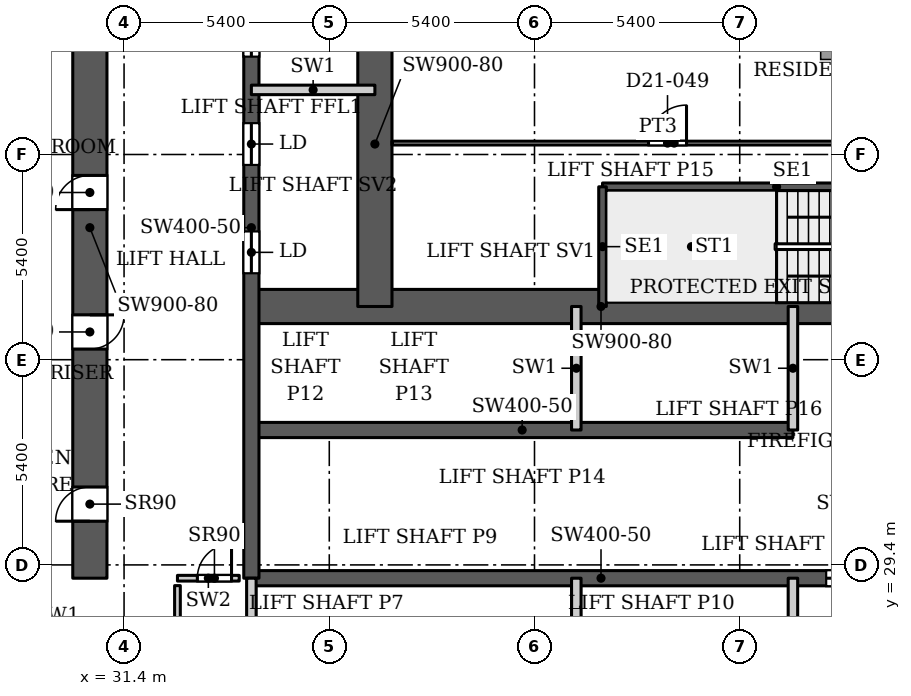
"""IFC4 building model, lengths in metres.
Left out: names, types, materials, properties, quantities, classifications, styles, units other than length and angle.
Written with IfcOpenShell. Run it as: python <this file> out.ifc"""

import sys

from ifc_helpers import new_model, si_unit, direction, frame, frame_2d, origin, place, context, subcontext, project, spatial, rectangle, extrude, source, transform, mapped, element, fill, save


model = new_model("IFC4")
c1 = context("Model", 3, precision=1e-05, world=origin(), true_north=direction((0.0, 1.0)))
c2 = subcontext(c1, "Body", "Model", "MODEL_VIEW")
j1 = project(units=[si_unit("LENGTHUNIT", "METRE"), si_unit("PLANEANGLEUNIT", "RADIAN")], contexts=[c1])
p1 = place(None, origin())
s1 = spatial("IfcSite", under=j1, at=p1, CompositionType="ELEMENT")
p2 = place(p1, origin())
s2 = spatial("IfcBuilding", under=s1, at=p2, CompositionType="ELEMENT")
p3 = place(p2, frame((0.0, 0.0, 94.1)))
s3 = spatial("IfcBuildingStorey", under=s2, at=p3, CompositionType="ELEMENT", Elevation=94.1)
p4 = place(p3, frame((34.75, 29.05, 0.0), z_axis=(0.0, 0.0, 1.0), x_axis=(1.0, 0.0, 0.0)))
e1 = element("IfcWall", 1, at=p4, inside=s3, PredefinedType="SHEAR", context=c2, shape_type="SweptSolid", body=[
    extrude(rectangle(XDim=18.4, YDim=0.4, at=frame_2d((9.2, 0.0))), origin(), (0.0, 0.0, 1.0), 3.9),
])
p5 = place(p4, frame((15.125, 0.0, 0.0)))
e2 = element("IfcOpeningElement", 2, at=p5, cuts=e1, PredefinedType="OPENING", context=c2, shape_type="SweptSolid", body=[
    extrude(rectangle(XDim=1.1, YDim=2.2, at=frame_2d((0.55, 1.1))), frame((0.0, 0.21, 0.0), z_axis=(0.0, -1.0, 0.0), x_axis=(1.0, 0.0, 0.0)), (0.0, 0.0, 1.0), 0.42),
])
p6 = place(p3, frame((34.75, 32.95, 0.0), z_axis=(0.0, 0.0, 1.0), x_axis=(1.0, 0.0, 0.0)))
e3 = element("IfcWall", 3, at=p6, inside=s3, PredefinedType="SHEAR", context=c2, shape_type="SweptSolid", body=[
    extrude(rectangle(XDim=14.25, YDim=0.4, at=frame_2d((7.125, 0.0))), origin(), (0.0, 0.0, 1.0), 3.9),
])
p7 = place(p3, frame((34.75, 36.2, 0.0), z_axis=(0.0, 0.0, 1.0), x_axis=(1.0, 0.0, 0.0)))
e4 = element("IfcWall", 4, at=p7, inside=s3, PredefinedType="SHEAR", context=c2, shape_type="SweptSolid", body=[
    extrude(rectangle(XDim=18.4, YDim=0.9, at=frame_2d((9.2, 0.0))), origin(), (0.0, 0.0, 1.0), 3.9),
])
p8 = place(p7, frame((16.9, 0.0, 0.0)))
e5 = element("IfcOpeningElement", 5, at=p8, cuts=e4, PredefinedType="OPENING", context=c2, shape_type="SweptSolid", body=[
    extrude(rectangle(XDim=1.0, YDim=2.2, at=frame_2d((0.5, 1.1))), frame((0.0, 0.46, 0.0), z_axis=(0.0, -1.0, 0.0), x_axis=(1.0, 0.0, 0.0)), (0.0, 0.0, 1.0), 0.92),
])
p9 = place(p3, frame((34.75, 29.05, 0.0), z_axis=(0.0, 0.0, 1.0), x_axis=(0.0, 1.0, 0.0)))
e6 = element("IfcWall", 6, at=p9, inside=s3, PredefinedType="SHEAR", context=c2, shape_type="SweptSolid", body=[
    extrude(rectangle(XDim=18.45, YDim=0.4, at=frame_2d((9.225, 0.0))), origin(), (0.0, 0.0, 1.0), 3.9),
])
p10 = place(p9, frame((8.025, 0.0, 0.0)))
e7 = element("IfcOpeningElement", 7, at=p10, cuts=e6, PredefinedType="OPENING", context=c2, shape_type="SweptSolid", body=[
    extrude(rectangle(XDim=1.1, YDim=2.2, at=frame_2d((0.55, 1.1))), frame((0.0, 0.21, 0.0), z_axis=(0.0, -1.0, 0.0), x_axis=(1.0, 0.0, 0.0)), (0.0, 0.0, 1.0), 0.42),
])
p11 = place(p9, frame((10.875, 0.0, 0.0)))
e8 = element("IfcOpeningElement", 8, at=p11, cuts=e6, PredefinedType="OPENING", context=c2, shape_type="SweptSolid", body=[
    extrude(rectangle(XDim=1.1, YDim=2.2, at=frame_2d((0.55, 1.1))), frame((0.0, 0.21, 0.0), z_axis=(0.0, -1.0, 0.0), x_axis=(1.0, 0.0, 0.0)), (0.0, 0.0, 1.0), 0.42),
])
p12 = place(p9, frame((13.725, 0.0, 0.0)))
e9 = element("IfcOpeningElement", 9, at=p12, cuts=e6, PredefinedType="OPENING", context=c2, shape_type="SweptSolid", body=[
    extrude(rectangle(XDim=1.1, YDim=2.2, at=frame_2d((0.55, 1.1))), frame((0.0, 0.21, 0.0), z_axis=(0.0, -1.0, 0.0), x_axis=(1.0, 0.0, 0.0)), (0.0, 0.0, 1.0), 0.42),
])
p13 = place(p9, frame((15.95, 0.0, 0.0)))
e10 = element("IfcOpeningElement", 10, at=p13, cuts=e6, PredefinedType="OPENING", context=c2, shape_type="SweptSolid", body=[
    extrude(rectangle(XDim=1.1, YDim=2.2, at=frame_2d((0.55, 1.1))), frame((0.0, 0.21, 0.0), z_axis=(0.0, -1.0, 0.0), x_axis=(1.0, 0.0, 0.0)), (0.0, 0.0, 1.0), 0.42),
])
p14 = place(p3, frame((38.0, 36.2, 0.0), z_axis=(0.0, 0.0, 1.0), x_axis=(0.0, 1.0, 0.0)))
e11 = element("IfcWall", 11, at=p14, inside=s3, PredefinedType="SHEAR", context=c2, shape_type="SweptSolid", body=[
    extrude(rectangle(XDim=8.55, YDim=0.9, at=frame_2d((4.275, 0.0))), origin(), (0.0, 0.0, 1.0), 3.9),
])
p15 = place(p3, frame((30.5, 29.05, 0.0), z_axis=(0.0, 0.0, 1.0), x_axis=(0.0, 1.0, 0.0)))
e12 = element("IfcWall", 12, at=p15, inside=s3, PredefinedType="SHEAR", context=c2, shape_type="SweptSolid", body=[
    extrude(rectangle(XDim=18.45, YDim=0.9, at=frame_2d((9.225, 0.0))), origin(), (0.0, 0.0, 1.0), 3.9),
])
p16 = place(p15, frame((1.5, 0.0, 0.0)))
e13 = element("IfcOpeningElement", 13, at=p16, cuts=e12, PredefinedType="OPENING", context=c2, shape_type="SweptSolid", body=[
    extrude(rectangle(XDim=0.9, YDim=2.2, at=frame_2d((0.45, 1.1))), frame((0.0, 0.46, 0.0), z_axis=(0.0, -1.0, 0.0), x_axis=(1.0, 0.0, 0.0)), (0.0, 0.0, 1.0), 0.92),
])
p17 = place(p15, frame((6.03, 0.0, 0.0)))
e14 = element("IfcOpeningElement", 14, at=p17, cuts=e12, PredefinedType="OPENING", context=c2, shape_type="SweptSolid", body=[
    extrude(rectangle(XDim=0.9, YDim=2.2, at=frame_2d((0.45, 1.1))), frame((0.0, 0.46, 0.0), z_axis=(0.0, -1.0, 0.0), x_axis=(1.0, 0.0, 0.0)), (0.0, 0.0, 1.0), 0.92),
])
p18 = place(p15, frame((9.7, 0.0, 0.0)))
e15 = element("IfcOpeningElement", 15, at=p18, cuts=e12, PredefinedType="OPENING", context=c2, shape_type="SweptSolid", body=[
    extrude(rectangle(XDim=0.9, YDim=2.2, at=frame_2d((0.45, 1.1))), frame((0.0, 0.46, 0.0), z_axis=(0.0, -1.0, 0.0), x_axis=(1.0, 0.0, 0.0)), (0.0, 0.0, 1.0), 0.92),
])
p19 = place(p3, frame((29.712, 26.072, 0.0), z_axis=(0.0, 0.0, 1.0), x_axis=(-0.511028049012, 0.859564036662, 0.0)))
e16 = element("IfcWall", 16, at=p19, inside=s3, PredefinedType="SOLIDWALL", context=c2, shape_type="SweptSolid", body=[
    extrude(rectangle(XDim=4.634, YDim=0.25, at=frame_2d((2.317, 0.0))), origin(), (0.0, 0.0, 1.0), 3.147),
])
p20 = place(p3, frame((27.195, 31.969, 0.0), z_axis=(0.0, 0.0, 1.0), x_axis=(0.052559748861, 0.998617781135, 0.0)))
e17 = element("IfcWall", 17, at=p20, inside=s3, PredefinedType="SOLIDWALL", context=c2, shape_type="SweptSolid", body=[
    extrude(rectangle(XDim=55.972, YDim=0.25, at=frame_2d((27.986, 0.0))), origin(), (0.0, 0.0, 1.0), 3.75),
])
p21 = place(p3, frame((43.99, 39.35, 0.0), z_axis=(0.0, 0.0, 1.0), x_axis=(1.0, 0.0, 0.0)))
e18 = element("IfcWall", 18, at=p21, inside=s3, PredefinedType="SHEAR", context=c2, shape_type="SweptSolid", body=[
    extrude(rectangle(XDim=9.16, YDim=0.2, at=frame_2d((4.58, 0.0))), origin(), (0.0, 0.0, 1.0), 3.9),
])
p22 = place(p3, frame((43.99, 36.2, 0.0), z_axis=(0.0, 0.0, 1.0), x_axis=(0.0, 1.0, 0.0)))
e19 = element("IfcWall", 19, at=p22, inside=s3, PredefinedType="SHEAR", context=c2, shape_type="SweptSolid", body=[
    extrude(rectangle(XDim=3.15, YDim=0.2, at=frame_2d((1.575, 0.0))), origin(), (0.0, 0.0, 1.0), 3.9),
])
for number, where, z_axis, x_axis in (
    (20, (34.75, 25.8, 0.0), (0.0, 0.0, 1.0), (0.0, 1.0, 0.0)),
    (21, (43.3, 25.8, 0.0), (0.0, 0.0, 1.0), (0.0, 1.0, 0.0)),
    (22, (43.3, 32.95, 0.0), (0.0, 0.0, 1.0), (0.0, 1.0, 0.0)),
    (23, (49.0, 25.8, 0.0), (0.0, 0.0, 1.0), (0.0, 1.0, 0.0)),
    (24, (49.0, 32.95, 0.0), (0.0, 0.0, 1.0), (0.0, 1.0, 0.0)),
    (25, (34.75, 41.9, 0.0), (0.0, 0.0, 1.0), (1.0, 0.0, 0.0)),
):
    element("IfcWall", number, at=place(p3, frame(where, z_axis=z_axis, x_axis=x_axis)), inside=s3, PredefinedType="PARTITIONING", context=c2, shape_type="SweptSolid", body=[
        extrude(rectangle(XDim=3.25, YDim=0.25, at=frame_2d((1.625, 0.0))), origin(), (0.0, 0.0, 1.0), 3.9),
    ])
p23 = place(p3, frame((32.805, 29.05, 0.0), z_axis=(0.0, 0.0, 1.0), x_axis=(1.0, 0.0, 0.0)))
e26 = element("IfcWall", 26, at=p23, inside=s3, PredefinedType="PARTITIONING", context=c2, shape_type="SweptSolid", body=[
    extrude(rectangle(XDim=1.625, YDim=0.15, at=frame_2d((0.812, 0.0))), origin(), (0.0, 0.0, 1.0), 3.9),
])
p24 = place(p23, frame((0.523, 0.0, 0.0)))
e27 = element("IfcOpeningElement", 27, at=p24, cuts=e26, PredefinedType="OPENING", context=c2, shape_type="SweptSolid", body=[
    extrude(rectangle(XDim=0.9, YDim=2.2, at=frame_2d((0.45, 1.1))), frame((0.0, 0.085, 0.0), z_axis=(0.0, -1.0, 0.0), x_axis=(1.0, 0.0, 0.0)), (0.0, 0.0, 1.0), 0.17),
])
p25 = place(p3, frame((32.805, 24.98, 0.0), z_axis=(0.0, 0.0, 1.0), x_axis=(0.0, 1.0, 0.0)))
e28 = element("IfcWall", 28, at=p25, inside=s3, PredefinedType="PARTITIONING", context=c2, shape_type="SweptSolid", body=[
    extrude(rectangle(XDim=3.875, YDim=0.15, at=frame_2d((1.938, 0.0))), origin(), (0.0, 0.0, 1.0), 3.9),
])
p26 = place(p3, frame((38.449, 40.5, 0.0), z_axis=(0.0, 0.0, 1.0), x_axis=(1.0, 0.0, 0.0)))
e29 = element("IfcWall", 29, at=p26, inside=s3, PredefinedType="PARTITIONING", context=c2, shape_type="SweptSolid", body=[
    extrude(rectangle(XDim=14.851, YDim=0.1, at=frame_2d((7.426, 0.0))), origin(), (0.0, 0.0, 1.0), 3.6),
])
p27 = place(p26, frame((6.751, 0.0, 0.0)))
e30 = element("IfcOpeningElement", 30, at=p27, cuts=e29, PredefinedType="OPENING", context=c2, shape_type="SweptSolid", body=[
    extrude(rectangle(XDim=1.0, YDim=2.1, at=frame_2d((0.5, 1.05))), frame((0.0, 0.06, 0.0), z_axis=(0.0, -1.0, 0.0), x_axis=(1.0, 0.0, 0.0)), (0.0, 0.0, 1.0), 0.12),
])
m1 = source(origin(), c2, "Body", "SweptSolid", [
    extrude(rectangle(XDim=1.1, YDim=2.2, at=frame_2d((0.55, 1.1))), frame((0.0, 0.025, 0.0), z_axis=(0.0, -1.0, 0.0), x_axis=(1.0, 0.0, 0.0)), (0.0, 0.0, 1.0), 0.05),
])
p28 = place(p10, origin())
e31 = element("IfcDoor", 31, at=p28, inside=s3, OperationType="SLIDING_TO_LEFT", PredefinedType="DOOR", context=c2, shape_type="MappedRepresentation", body=[
    mapped(m1, transform((0.0, 0.0, 0.0), x_axis=(1.0, 0.0, 0.0), y_axis=(0.0, 1.0, 0.0), z_axis=(0.0, 0.0, 1.0), scale=1.0)),
])
fill(e7, e31)
p29 = place(p11, origin())
e32 = element("IfcDoor", 32, at=p29, inside=s3, OperationType="SLIDING_TO_LEFT", PredefinedType="DOOR", context=c2, shape_type="MappedRepresentation", body=[
    mapped(m1, transform((0.0, 0.0, 0.0), x_axis=(1.0, 0.0, 0.0), y_axis=(0.0, 1.0, 0.0), z_axis=(0.0, 0.0, 1.0), scale=1.0)),
])
fill(e8, e32)
p30 = place(p12, origin())
e33 = element("IfcDoor", 33, at=p30, inside=s3, OperationType="SLIDING_TO_LEFT", PredefinedType="DOOR", context=c2, shape_type="MappedRepresentation", body=[
    mapped(m1, transform((0.0, 0.0, 0.0), x_axis=(1.0, 0.0, 0.0), y_axis=(0.0, 1.0, 0.0), z_axis=(0.0, 0.0, 1.0), scale=1.0)),
])
fill(e9, e33)
p31 = place(p5, origin())
e34 = element("IfcDoor", 34, at=p31, inside=s3, OperationType="SLIDING_TO_LEFT", PredefinedType="DOOR", context=c2, shape_type="MappedRepresentation", body=[
    mapped(m1, transform((0.0, 0.0, 0.0), x_axis=(1.0, 0.0, 0.0), y_axis=(0.0, 1.0, 0.0), z_axis=(0.0, 0.0, 1.0), scale=1.0)),
])
fill(e2, e34)
m2 = source(origin(), c2, "Body", "SweptSolid", [
    extrude(rectangle(XDim=0.9, YDim=2.2, at=frame_2d((0.45, 1.1))), frame((0.0, 0.025, 0.0), z_axis=(0.0, -1.0, 0.0), x_axis=(1.0, 0.0, 0.0)), (0.0, 0.0, 1.0), 0.05),
])
p32 = place(p16, origin())
e35 = element("IfcDoor", 35, at=p32, inside=s3, OperationType="SINGLE_SWING_LEFT", PredefinedType="DOOR", context=c2, shape_type="MappedRepresentation", body=[
    mapped(m2, transform((0.0, 0.0, 0.0), x_axis=(1.0, 0.0, 0.0), y_axis=(0.0, 1.0, 0.0), z_axis=(0.0, 0.0, 1.0), scale=1.0)),
])
fill(e13, e35)
p33 = place(p17, origin())
e36 = element("IfcDoor", 36, at=p33, inside=s3, OperationType="SINGLE_SWING_RIGHT", PredefinedType="DOOR", context=c2, shape_type="MappedRepresentation", body=[
    mapped(m2, transform((0.0, 0.0, 0.0), x_axis=(1.0, 0.0, 0.0), y_axis=(0.0, 1.0, 0.0), z_axis=(0.0, 0.0, 1.0), scale=1.0)),
])
fill(e14, e36)
p34 = place(p18, origin())
e37 = element("IfcDoor", 37, at=p34, inside=s3, OperationType="SINGLE_SWING_LEFT", PredefinedType="DOOR", context=c2, shape_type="MappedRepresentation", body=[
    mapped(m2, transform((0.0, 0.0, 0.0), x_axis=(1.0, 0.0, 0.0), y_axis=(0.0, 1.0, 0.0), z_axis=(0.0, 0.0, 1.0), scale=1.0)),
])
fill(e15, e37)
p35 = place(p24, origin())
e38 = element("IfcDoor", 38, at=p35, inside=s3, OperationType="SINGLE_SWING_LEFT", PredefinedType="DOOR", context=c2, shape_type="MappedRepresentation", body=[
    mapped(m2, transform((0.0, 0.0, 0.0), x_axis=(1.0, 0.0, 0.0), y_axis=(0.0, 1.0, 0.0), z_axis=(0.0, 0.0, 1.0), scale=1.0)),
])
fill(e27, e38)
m3 = source(origin(), c2, "Body", "SweptSolid", [
    extrude(rectangle(XDim=1.0, YDim=2.1, at=frame_2d((0.5, 1.05))), frame((0.0, 0.025, 0.0), z_axis=(0.0, -1.0, 0.0), x_axis=(1.0, 0.0, 0.0)), (0.0, 0.0, 1.0), 0.05),
])
p36 = place(p27, origin())
e39 = element("IfcDoor", 39, at=p36, inside=s3, OperationType="SINGLE_SWING_LEFT", PredefinedType="DOOR", context=c2, shape_type="MappedRepresentation", body=[
    mapped(m3, transform((0.0, 0.0, 0.0), x_axis=(1.0, 0.0, 0.0), y_axis=(0.0, 1.0, 0.0), z_axis=(0.0, 0.0, 1.0), scale=1.0)),
])
fill(e30, e39)
save(model, sys.argv[1])
